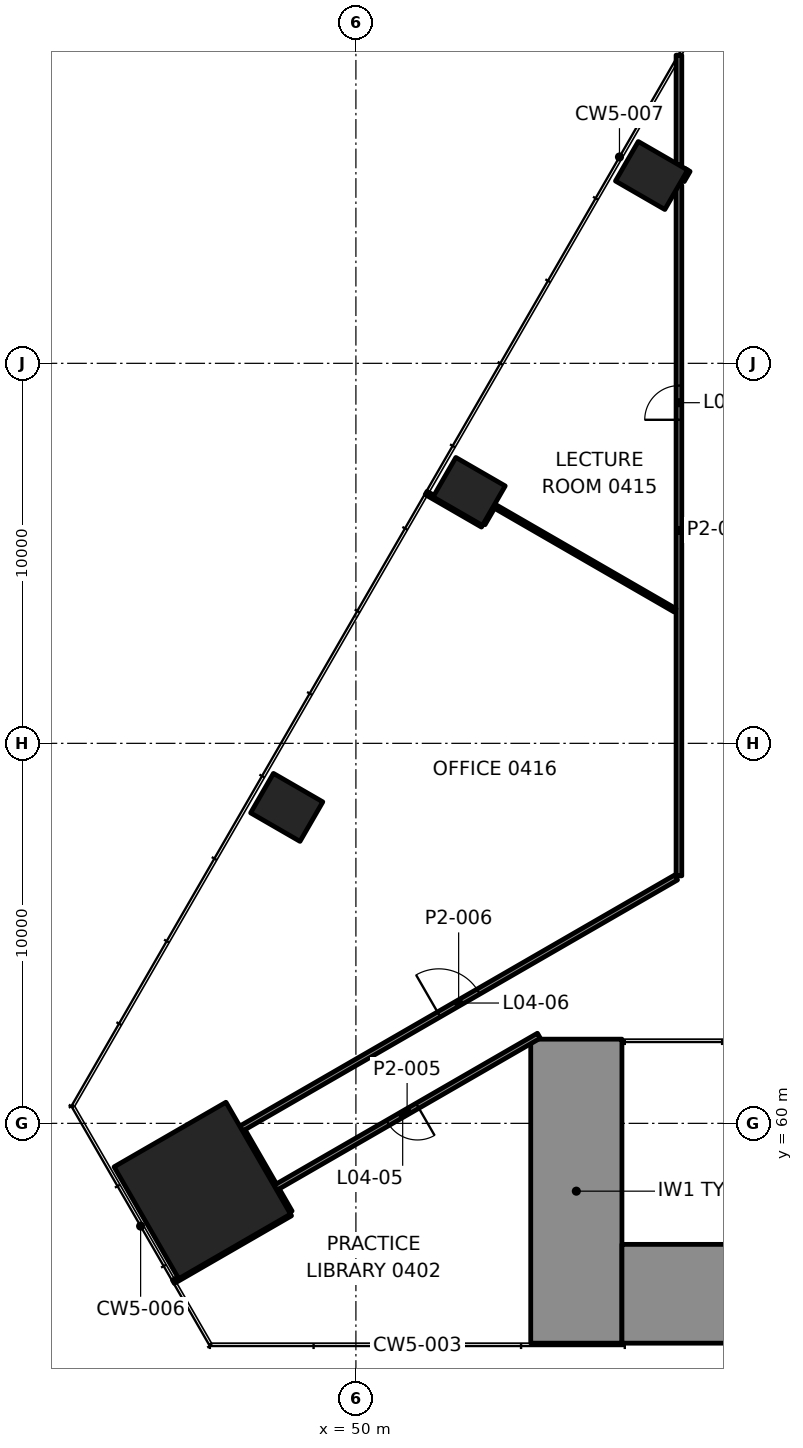
"""IFC4 building model, lengths in metres.
Left out: names, types, materials, properties, quantities, classifications, styles, units other than length and angle.
Written with IfcOpenShell. Run it as: python <this file> out.ifc"""

import sys

from ifc_helpers import new_model, si_unit, direction, frame, frame_2d, origin, origin_2d, place, context, subcontext, project, spatial, rectangle, extrude, element, fill, save


model = new_model("IFC4")
c1 = context("Model", 3, precision=1e-05, world=origin(), true_north=direction((0.0, 1.0)))
c2 = subcontext(c1, "Body", "Model", "MODEL_VIEW")
j1 = project(units=[si_unit("LENGTHUNIT", "METRE"), si_unit("PLANEANGLEUNIT", "RADIAN")], contexts=[c1])
p1 = place(None, origin())
s1 = spatial("IfcSite", under=j1, at=p1, CompositionType="ELEMENT")
p2 = place(p1, origin())
s2 = spatial("IfcBuilding", under=s1, at=p2, CompositionType="ELEMENT")
p3 = place(p2, frame((0.0, 0.0, 21.8)))
s3 = spatial("IfcBuildingStorey", under=s2, at=p3, CompositionType="ELEMENT", Elevation=21.8)
p4 = place(p3, frame((55.8, 54.215, 0.0), z_axis=(0.0, 0.0, 1.0), x_axis=(0.0, 1.0, 0.0)))
e1 = element("IfcWall", 1, at=p4, inside=s3, PredefinedType="SHEAR", context=c2, shape_type="SweptSolid", body=[
    extrude(rectangle(XDim=8.0, YDim=2.4, at=frame_2d((4.0, 0.0))), origin(), (0.0, 0.0, 1.0), 4.6),
])
p5 = place(p3, frame((57.0, 55.515, 0.2), z_axis=(0.0, 0.0, 1.0), x_axis=(1.0, 0.0, 0.0)))
e2 = element("IfcWall", 2, at=p5, inside=s3, PredefinedType="SOLIDWALL", context=c2, shape_type="SweptSolid", body=[
    extrude(rectangle(XDim=8.094, YDim=2.6, at=frame_2d((4.047, 0.0))), origin(), (0.0, 0.0, 1.0), 2.0),
])
p6 = place(p3, frame((57.0, 55.515, 2.2), z_axis=(0.0, 0.0, 1.0), x_axis=(1.0, 0.0, 0.0)))
e3 = element("IfcWall", 3, at=p6, inside=s3, PredefinedType="SOLIDWALL", context=c2, shape_type="SweptSolid", body=[
    extrude(rectangle(XDim=9.93, YDim=2.6, at=frame_2d((4.965, 0.0))), origin(), (0.0, 0.0, 1.0), 2.0),
])
p7 = place(p3, frame((57.0, 55.515, 4.2), z_axis=(0.0, 0.0, 1.0), x_axis=(1.0, 0.0, 0.0)))
e4 = element("IfcWall", 4, at=p7, inside=s3, PredefinedType="SOLIDWALL", context=c2, shape_type="SweptSolid", body=[
    extrude(rectangle(XDim=12.109, YDim=2.6, at=frame_2d((6.055, 0.0))), origin(), (0.0, 0.0, 1.0), 2.0),
])
p8 = place(p3, frame((45.959, 58.233, 0.0), z_axis=(0.0, 0.0, 1.0), x_axis=(0.5, -0.866025403784, 0.0)))
e5 = element("IfcColumn", 5, at=p8, inside=s3, PredefinedType="COLUMN", context=c2, shape_type="SweptSolid", body=[
    extrude(rectangle(XDim=3.4, YDim=3.4, at=origin_2d()), origin(), (0.0, 0.0, 1.0), 4.6),
])
for number, where, z_axis, x_axis in (
    (6, (57.78, 84.942, -0.0), (0.0, 0.0, 1.0), (-0.5, -0.866, 0.0)),
    (7, (52.979, 76.628, -0.0), (0.0, 0.0, 1.0), (-0.5, -0.866, 0.0)),
    (8, (48.179, 68.315, -0.0), (0.0, 0.0, 1.0), (-0.5, -0.866, 0.0)),
):
    element("IfcColumn", number, at=place(p3, frame(where, z_axis=z_axis, x_axis=x_axis)), inside=s3, PredefinedType="COLUMN", context=c2, shape_type="SweptSolid", body=[
        extrude(rectangle(XDim=1.2, YDim=1.5, at=origin_2d()), origin(), (0.0, 0.0, 1.0), 4.6),
    ])
p9 = place(p3, frame((45.198, 55.831, 0.0), z_axis=(0.0, 0.0, 1.0), x_axis=(0.866014251095, 0.500019316528, 0.0)))
e9 = element("IfcWall", 9, at=p9, inside=s3, PredefinedType="PARTITIONING", context=c2, shape_type="SweptSolid", body=[
    extrude(rectangle(XDim=3.559, YDim=0.1, at=frame_2d((1.78, 0.0))), origin(), (0.0, 0.0, 1.0), 3.7),
])
p10 = place(p3, frame((54.814, 62.306, 0.0), z_axis=(0.0, 0.0, 1.0), x_axis=(-0.866017985154, -0.500012849225, 0.0)))
e10 = element("IfcWall", 10, at=p10, inside=s3, PredefinedType="PARTITIONING", context=c2, shape_type="SweptSolid", body=[
    extrude(rectangle(XDim=8.005, YDim=0.15, at=frame_2d((4.002, 0.0))), origin(), (0.0, 0.0, 1.0), 3.547),
])
p11 = place(p10, frame((3.688, 0.0, 0.0)))
e11 = element("IfcOpeningElement", 11, at=p11, cuts=e10, PredefinedType="OPENING", context=c2, shape_type="SweptSolid", body=[
    extrude(rectangle(XDim=0.9, YDim=2.1, at=frame_2d((0.45, 1.05))), frame((0.0, 0.085, 0.0), z_axis=(0.0, -1.0, 0.0), x_axis=(1.0, 0.0, 0.0)), (0.0, 0.0, 1.0), 0.17),
])
p12 = place(p3, frame((46.981, 59.863, 0.0), z_axis=(0.0, 0.0, 1.0), x_axis=(0.866026517173, 0.499998071549, 0.0)))
e12 = element("IfcWall", 12, at=p12, inside=s3, PredefinedType="PARTITIONING", context=c2, shape_type="SweptSolid", body=[
    extrude(rectangle(XDim=13.214, YDim=0.15, at=frame_2d((6.607, 0.0))), origin(), (0.0, 0.0, 1.0), 3.7),
])
p13 = place(p12, frame((6.007, 0.0, 0.0)))
e13 = element("IfcOpeningElement", 13, at=p13, cuts=e12, PredefinedType="OPENING", context=c2, shape_type="SweptSolid", body=[
    extrude(rectangle(XDim=1.2, YDim=2.1, at=frame_2d((0.6, 1.05))), frame((0.0, 0.085, 0.0), z_axis=(0.0, -1.0, 0.0), x_axis=(1.0, 0.0, 0.0)), (0.0, 0.0, 1.0), 0.17),
])
p14 = place(p3, frame((53.354, 75.778, 0.0), z_axis=(0.0, 0.0, 1.0), x_axis=(0.500187988959, 0.865916841101, 0.0)))
e14 = element("IfcWall", 14, at=p14, inside=s3, PredefinedType="PARTITIONING", context=c2, shape_type="SweptSolid", body=[
    extrude(rectangle(XDim=0.499, YDim=0.1, at=frame_2d((0.25, 0.0))), origin(), (0.0, 0.0, 1.0), 3.7),
])
p15 = place(p3, frame((58.575, 84.821, 0.0), z_axis=(0.0, 0.0, 1.0), x_axis=(0.500317227461, 0.865842174941, 0.0)))
e15 = element("IfcWall", 15, at=p15, inside=s3, PredefinedType="PARTITIONING", context=c2, shape_type="SweptSolid", body=[
    extrude(rectangle(XDim=0.308, YDim=0.15, at=frame_2d((0.154, 0.0))), origin(), (0.0, 0.0, 1.0), 3.7),
])
p16 = place(p3, frame((58.5, 66.513, 0.0), z_axis=(0.0, 0.0, 1.0), x_axis=(0.0, 1.0, 0.0)))
e16 = element("IfcWall", 16, at=p16, inside=s3, PredefinedType="PARTITIONING", context=c2, shape_type="SweptSolid", body=[
    extrude(rectangle(XDim=18.177, YDim=0.15, at=frame_2d((9.089, 0.0))), origin(), (0.0, 0.0, 1.0), 3.7),
])
p17 = place(p16, frame((12.001, 0.0, 0.0)))
e17 = element("IfcOpeningElement", 17, at=p17, cuts=e16, PredefinedType="OPENING", context=c2, shape_type="SweptSolid", body=[
    extrude(rectangle(XDim=0.9, YDim=2.1, at=frame_2d((0.45, 1.05))), frame((0.0, 0.085, 0.0), z_axis=(0.0, -1.0, 0.0), x_axis=(1.0, 0.0, 0.0)), (0.0, 0.0, 1.0), 0.17),
])
p18 = place(p3, frame((58.5, 85.219, 0.0), z_axis=(0.0, 0.0, 1.0), x_axis=(0.0, 1.0, 0.0)))
e18 = element("IfcWall", 18, at=p18, inside=s3, PredefinedType="PARTITIONING", context=c2, shape_type="SweptSolid", body=[
    extrude(rectangle(XDim=2.891, YDim=0.15, at=frame_2d((1.445, 0.0))), origin(), (0.0, 0.0, 1.0), 3.465),
])
p19 = place(p3, frame((48.256, 57.655, 0.0), z_axis=(0.0, 0.0, 1.0), x_axis=(-0.500108776725, 0.865962592404, 0.0)))
e19 = element("IfcWall", 19, at=p19, inside=s3, PredefinedType="PARTITIONING", context=c2, shape_type="SweptSolid", body=[
    extrude(rectangle(XDim=0.675, YDim=0.15, at=frame_2d((0.337, 0.0))), origin(), (0.0, 0.0, 1.0), 3.7),
])
p20 = place(p3, frame((58.399, 73.5, 0.0), z_axis=(0.0, 0.0, 1.0), x_axis=(-0.866041657848, 0.499971846079, 0.0)))
e20 = element("IfcWall", 20, at=p20, inside=s3, PredefinedType="PARTITIONING", context=c2, shape_type="SweptSolid", body=[
    extrude(rectangle(XDim=5.508, YDim=0.1, at=frame_2d((2.754, 0.0))), origin(), (0.0, 0.0, 1.0), 3.7),
])
p21 = place(p3, frame((53.329, 75.734, 0.0), z_axis=(0.0, 0.0, 1.0), x_axis=(-0.866028621479, 0.499994426748, 0.0)))
e21 = element("IfcWall", 21, at=p21, inside=s3, PredefinedType="PARTITIONING", context=c2, shape_type="SweptSolid", body=[
    extrude(rectangle(XDim=1.709, YDim=0.1, at=frame_2d((0.855, 0.0))), origin(), (0.0, 0.0, 1.0), 3.465),
])
p22 = place(p3, frame((47.844, 58.369, 0.0), z_axis=(0.0, 0.0, 1.0), x_axis=(-0.499991515992, 0.866030301974, 0.0)))
e22 = element("IfcWall", 22, at=p22, inside=s3, PredefinedType="PARTITIONING", context=c2, shape_type="SweptSolid", body=[
    extrude(rectangle(XDim=1.649, YDim=0.15, at=frame_2d((0.825, 0.0))), origin(), (0.0, 0.0, 1.0), 3.547),
])
p23 = place(p2, origin())
s4 = spatial("IfcBuildingStorey", under=s2, at=p23, CompositionType="ELEMENT", Elevation=0.0)
p24 = place(p23, frame((54.38, 53.715, -0.15), z_axis=(0.0, 0.0, 1.0), x_axis=(1.0, 0.0, 0.0)))
e23 = element("IfcWall", 23, at=p24, inside=s4, PredefinedType="SOLIDWALL", context=c2, shape_type="SweptSolid", body=[
    extrude(rectangle(XDim=2.62, YDim=1.0, at=frame_2d((1.31, 0.0))), origin(), (0.0, 0.0, 1.0), 28.95),
])
p25 = place(p11, origin())
e24 = element("IfcDoor", 24, at=p25, inside=s3, OperationType="SINGLE_SWING_RIGHT", PredefinedType="DOOR", context=c2, shape_type="SweptSolid", body=[
    extrude(rectangle(XDim=0.9, YDim=2.1, at=frame_2d((0.45, 1.05))), frame((0.0, 0.025, 0.0), z_axis=(0.0, -1.0, 0.0), x_axis=(1.0, 0.0, 0.0)), (0.0, 0.0, 1.0), 0.05),
])
fill(e11, e24)
p26 = place(p13, origin())
e25 = element("IfcDoor", 25, at=p26, inside=s3, OperationType="DOUBLE_DOOR_SINGLE_SWING", PredefinedType="DOOR", context=c2, shape_type="SweptSolid", body=[
    extrude(rectangle(XDim=1.2, YDim=2.1, at=frame_2d((0.6, 1.05))), frame((0.0, 0.025, 0.0), z_axis=(0.0, -1.0, 0.0), x_axis=(1.0, 0.0, 0.0)), (0.0, 0.0, 1.0), 0.05),
])
fill(e13, e25)
p27 = place(p17, origin())
e26 = element("IfcDoor", 26, at=p27, inside=s3, OperationType="SINGLE_SWING_RIGHT", PredefinedType="DOOR", context=c2, shape_type="SweptSolid", body=[
    extrude(rectangle(XDim=0.9, YDim=2.1, at=frame_2d((0.45, 1.05))), frame((0.0, 0.025, 0.0), z_axis=(0.0, -1.0, 0.0), x_axis=(1.0, 0.0, 0.0)), (0.0, 0.0, 1.0), 0.05),
])
fill(e17, e26)
save(model, sys.argv[1])
